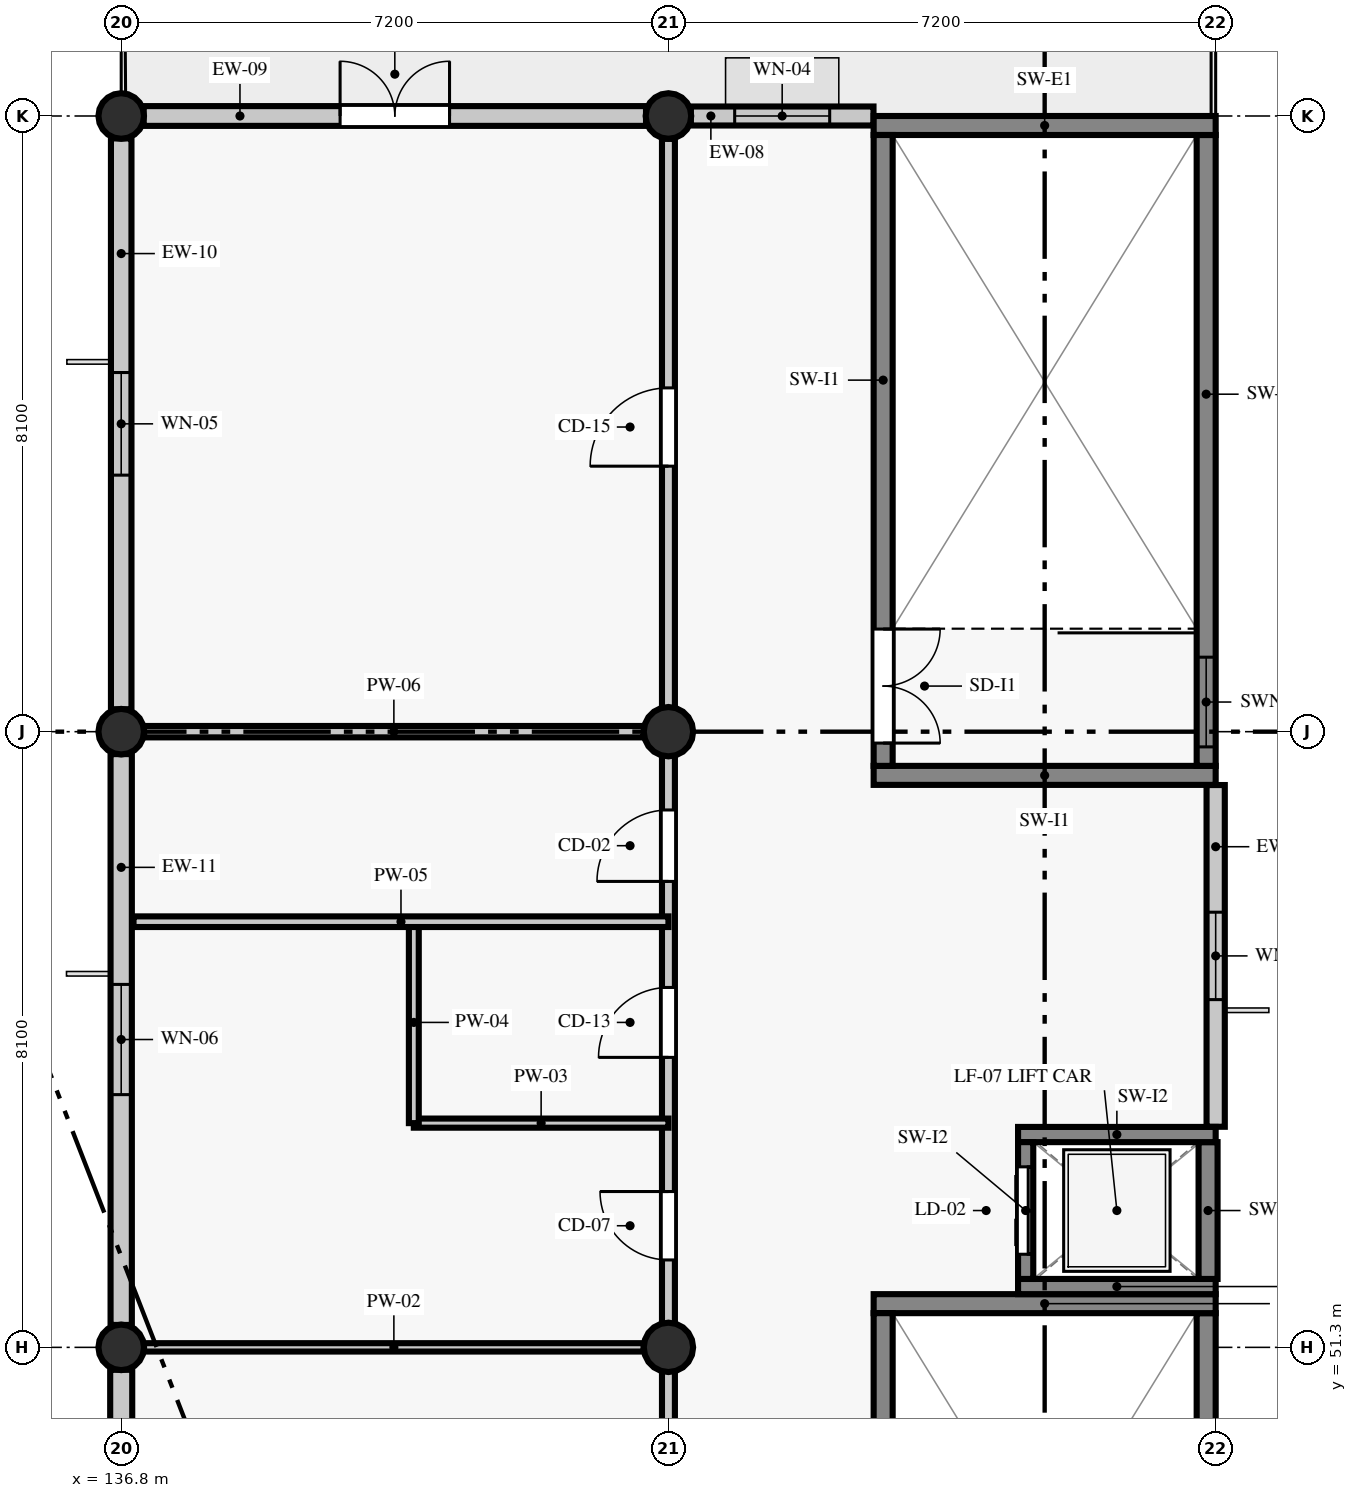
"""IFC4 building model, lengths in metres.
Left out: names, types, materials, properties, quantities, classifications, styles, units other than length and angle.
Written with IfcOpenShell. Run it as: python <this file> out.ifc"""

import sys

from ifc_helpers import new_model, si_unit, direction, frame, frame_2d, origin, origin_2d, place, context, subcontext, project, spatial, rectangle, circle, extrude, element, fill, save


model = new_model("IFC4")
c1 = context("Model", 3, precision=1e-05, world=origin(), true_north=direction((0.0, 1.0)))
c2 = subcontext(c1, "Body", "Model", "MODEL_VIEW")
j1 = project(units=[si_unit("LENGTHUNIT", "METRE"), si_unit("PLANEANGLEUNIT", "RADIAN")], contexts=[c1])
p1 = place(None, origin())
s1 = spatial("IfcSite", under=j1, at=p1, CompositionType="ELEMENT")
p2 = place(p1, origin())
s2 = spatial("IfcBuilding", under=s1, at=p2, CompositionType="ELEMENT")
p3 = place(p2, frame((0.0, 0.0, 9.6)))
s3 = spatial("IfcBuildingStorey", under=s2, at=p3, CompositionType="ELEMENT", Elevation=9.6)
for number, where, z_axis, x_axis in (
    (1, (136.8, 51.3, 0.0), (0.0, 0.0, 1.0), (1.0, 0.0, 0.0)),
    (2, (136.8, 59.4, 0.0), (0.0, 0.0, 1.0), (1.0, 0.0, 0.0)),
    (3, (136.8, 67.5, 0.0), (0.0, 0.0, 1.0), (1.0, 0.0, 0.0)),
):
    element("IfcColumn", number, at=place(p3, frame(where, z_axis=z_axis, x_axis=x_axis)), inside=s3, PredefinedType="COLUMN", context=c2, shape_type="SweptSolid", body=[
        extrude(circle(Radius=0.3, at=origin_2d()), origin(), (0.0, 0.0, 1.0), 4.2),
    ])
for number, where, z_axis, x_axis in (
    (4, (144.0, 51.3, 0.0), (0.0, 0.0, 1.0), (1.0, 0.0, 0.0)),
    (5, (144.0, 59.4, 0.0), (0.0, 0.0, 1.0), (1.0, 0.0, 0.0)),
):
    element("IfcColumn", number, at=place(p3, frame(where, z_axis=z_axis, x_axis=x_axis)), inside=s3, PredefinedType="COLUMN", context=c2, shape_type="SweptSolid", body=[
        extrude(circle(Radius=0.325, at=origin_2d()), origin(), (0.0, 0.0, 1.0), 4.2),
    ])
p4 = place(p3, frame((144.0, 67.5, 0.0), z_axis=(0.0, 0.0, 1.0), x_axis=(1.0, 0.0, 0.0)))
e6 = element("IfcColumn", 6, at=p4, inside=s3, PredefinedType="COLUMN", context=c2, shape_type="SweptSolid", body=[
    extrude(circle(Radius=0.3, at=origin_2d()), origin(), (0.0, 0.0, 1.0), 4.2),
])
p5 = place(p3, frame((151.2, 54.202, 0.0), z_axis=(0.0, 0.0, 1.0), x_axis=(0.0, 1.0, 0.0)))
e7 = element("IfcWall", 7, at=p5, inside=s3, PredefinedType="STANDARD", context=c2, shape_type="SweptSolid", body=[
    extrude(rectangle(XDim=4.496, YDim=0.24, at=frame_2d((2.248, 0.0))), origin(), (0.0, 0.0, 1.0), 4.2),
])
p6 = place(p5, frame((1.673, 0.0, 0.9)))
e8 = element("IfcOpeningElement", 8, at=p6, cuts=e7, PredefinedType="OPENING", context=c2, shape_type="SweptSolid", body=[
    extrude(rectangle(XDim=1.15, YDim=1.3, at=frame_2d((0.575, 0.65))), frame((0.0, 0.13, 0.0), z_axis=(0.0, -1.0, 0.0), x_axis=(1.0, 0.0, 0.0)), (0.0, 0.0, 1.0), 0.26),
])
p7 = place(p3, frame((146.698, 67.5, 0.0), z_axis=(0.0, 0.0, 1.0), x_axis=(-1.0, 0.0, 0.0)))
e9 = element("IfcWall", 9, at=p7, inside=s3, PredefinedType="STANDARD", context=c2, shape_type="SweptSolid", body=[
    extrude(rectangle(XDim=2.403, YDim=0.25, at=frame_2d((1.202, 0.0))), origin(), (0.0, 0.0, 1.0), 4.2),
])
p8 = place(p7, frame((0.576, 0.0, 0.9)))
e10 = element("IfcOpeningElement", 10, at=p8, cuts=e9, PredefinedType="OPENING", context=c2, shape_type="SweptSolid", body=[
    extrude(rectangle(XDim=1.25, YDim=1.3, at=frame_2d((0.625, 0.65))), frame((0.0, 0.135, 0.0), z_axis=(0.0, -1.0, 0.0), x_axis=(1.0, 0.0, 0.0)), (0.0, 0.0, 1.0), 0.27),
])
p9 = place(p3, frame((143.705, 67.5, 0.0), z_axis=(0.0, 0.0, 1.0), x_axis=(-1.0, 0.0, 0.0)))
e11 = element("IfcWall", 11, at=p9, inside=s3, PredefinedType="STANDARD", context=c2, shape_type="SweptSolid", body=[
    extrude(rectangle(XDim=6.61, YDim=0.26, at=frame_2d((3.305, 0.0))), origin(), (0.0, 0.0, 1.0), 3.55),
])
p10 = place(p9, frame((2.585, 0.0, 0.0)))
e12 = element("IfcOpeningElement", 12, at=p10, cuts=e11, PredefinedType="OPENING", context=c2, shape_type="SweptSolid", body=[
    extrude(rectangle(XDim=1.44, YDim=2.16, at=frame_2d((0.72, 1.08))), frame((0.0, 0.14, 0.0), z_axis=(0.0, -1.0, 0.0), x_axis=(1.0, 0.0, 0.0)), (0.0, 0.0, 1.0), 0.28),
])
p11 = place(p3, frame((136.8, 67.205, 0.0), z_axis=(0.0, 0.0, 1.0), x_axis=(0.0, -1.0, 0.0)))
e13 = element("IfcWall", 13, at=p11, inside=s3, PredefinedType="STANDARD", context=c2, shape_type="SweptSolid", body=[
    extrude(rectangle(XDim=7.51, YDim=0.27, at=frame_2d((3.755, 0.0))), origin(), (0.0, 0.0, 1.0), 3.55),
])
p12 = place(p11, frame((3.08, 0.0, 0.9)))
e14 = element("IfcOpeningElement", 14, at=p12, cuts=e13, PredefinedType="OPENING", context=c2, shape_type="SweptSolid", body=[
    extrude(rectangle(XDim=1.35, YDim=1.3, at=frame_2d((0.675, 0.65))), frame((0.0, 0.145, 0.0), z_axis=(0.0, -1.0, 0.0), x_axis=(1.0, 0.0, 0.0)), (0.0, 0.0, 1.0), 0.29),
])
p13 = place(p3, frame((136.8, 59.105, 0.0), z_axis=(0.0, 0.0, 1.0), x_axis=(0.0, -1.0, 0.0)))
e15 = element("IfcWall", 15, at=p13, inside=s3, PredefinedType="STANDARD", context=c2, shape_type="SweptSolid", body=[
    extrude(rectangle(XDim=7.51, YDim=0.28, at=frame_2d((3.755, 0.0))), origin(), (0.0, 0.0, 1.0), 3.55),
])
p14 = place(p13, frame((3.03, 0.0, 0.9)))
e16 = element("IfcOpeningElement", 16, at=p14, cuts=e15, PredefinedType="OPENING", context=c2, shape_type="SweptSolid", body=[
    extrude(rectangle(XDim=1.45, YDim=1.3, at=frame_2d((0.725, 0.65))), frame((0.0, 0.15, 0.0), z_axis=(0.0, -1.0, 0.0), x_axis=(1.0, 0.0, 0.0)), (0.0, 0.0, 1.0), 0.3),
])
p15 = place(p3, frame((136.8, 51.005, 0.0), z_axis=(0.0, 0.0, 1.0), x_axis=(0.0, -1.0, 0.0)))
e17 = element("IfcWall", 17, at=p15, inside=s3, PredefinedType="STANDARD", context=c2, shape_type="SweptSolid", body=[
    extrude(rectangle(XDim=7.51, YDim=0.29, at=frame_2d((3.755, 0.0))), origin(), (0.0, 0.0, 1.0), 3.55),
])
p16 = place(p15, frame((2.98, 0.0, 0.9)))
e18 = element("IfcOpeningElement", 18, at=p16, cuts=e17, PredefinedType="OPENING", context=c2, shape_type="SweptSolid", body=[
    extrude(rectangle(XDim=1.55, YDim=1.3, at=frame_2d((0.775, 0.65))), frame((0.0, 0.155, 0.0), z_axis=(0.0, -1.0, 0.0), x_axis=(1.0, 0.0, 0.0)), (0.0, 0.0, 1.0), 0.31),
])
p17 = place(p3, frame((151.075, 43.45, 0.0), z_axis=(0.0, 0.0, 1.0), x_axis=(0.0, 1.0, 0.0)))
e19 = element("IfcWall", 19, at=p17, inside=s3, PredefinedType="SHEAR", context=c2, shape_type="SweptSolid", body=[
    extrude(rectangle(XDim=8.3, YDim=0.25, at=frame_2d((4.15, 0.0))), origin(), (0.0, 0.0, 1.0), 4.2),
])
p18 = place(p17, frame((0.25, 0.0, 0.92)))
e20 = element("IfcOpeningElement", 20, at=p18, cuts=e19, PredefinedType="OPENING", context=c2, shape_type="SweptSolid", body=[
    extrude(rectangle(XDim=1.18, YDim=1.48, at=frame_2d((0.59, 0.74))), frame((0.0, 0.135, 0.0), z_axis=(0.0, -1.0, 0.0), x_axis=(1.0, 0.0, 0.0)), (0.0, 0.0, 1.0), 0.27),
])
p19 = place(p3, frame((151.2, 51.875, 0.0), z_axis=(0.0, 0.0, 1.0), x_axis=(-1.0, 0.0, 0.0)))
e21 = element("IfcWall", 21, at=p19, inside=s3, PredefinedType="SHEAR", context=c2, shape_type="SweptSolid", body=[
    extrude(rectangle(XDim=4.5, YDim=0.25, at=frame_2d((2.25, 0.0))), origin(), (0.0, 0.0, 1.0), 4.2),
])
p20 = place(p3, frame((146.825, 51.75, 0.0), z_axis=(0.0, 0.0, 1.0), x_axis=(0.0, -1.0, 0.0)))
e22 = element("IfcWall", 22, at=p20, inside=s3, PredefinedType="SHEAR", context=c2, shape_type="SweptSolid", body=[
    extrude(rectangle(XDim=8.3, YDim=0.25, at=frame_2d((4.15, 0.0))), origin(), (0.0, 0.0, 1.0), 4.2),
])
p21 = place(p20, frame((6.5, 0.0, 0.0)))
e23 = element("IfcOpeningElement", 23, at=p21, cuts=e22, PredefinedType="OPENING", context=c2, shape_type="SweptSolid", body=[
    extrude(rectangle(XDim=1.5, YDim=2.15, at=frame_2d((0.75, 1.075))), frame((0.0, 0.135, 0.0), z_axis=(0.0, -1.0, 0.0), x_axis=(1.0, 0.0, 0.0)), (0.0, 0.0, 1.0), 0.27),
])
p22 = place(p3, frame((146.7, 58.825, 0.0), z_axis=(0.0, 0.0, 1.0), x_axis=(1.0, 0.0, 0.0)))
e24 = element("IfcWall", 24, at=p22, inside=s3, PredefinedType="SHEAR", context=c2, shape_type="SweptSolid", body=[
    extrude(rectangle(XDim=4.5, YDim=0.25, at=frame_2d((2.25, 0.0))), origin(), (0.0, 0.0, 1.0), 4.2),
])
p23 = place(p3, frame((151.075, 58.95, 0.0), z_axis=(0.0, 0.0, 1.0), x_axis=(0.0, 1.0, 0.0)))
e25 = element("IfcWall", 25, at=p23, inside=s3, PredefinedType="SHEAR", context=c2, shape_type="SweptSolid", body=[
    extrude(rectangle(XDim=8.3, YDim=0.25, at=frame_2d((4.15, 0.0))), origin(), (0.0, 0.0, 1.0), 4.2),
])
p24 = place(p23, frame((0.25, 0.0, 0.92)))
e26 = element("IfcOpeningElement", 26, at=p24, cuts=e25, PredefinedType="OPENING", context=c2, shape_type="SweptSolid", body=[
    extrude(rectangle(XDim=1.18, YDim=1.48, at=frame_2d((0.59, 0.74))), frame((0.0, 0.135, 0.0), z_axis=(0.0, -1.0, 0.0), x_axis=(1.0, 0.0, 0.0)), (0.0, 0.0, 1.0), 0.27),
])
p25 = place(p3, frame((151.2, 67.375, 0.0), z_axis=(0.0, 0.0, 1.0), x_axis=(-1.0, 0.0, 0.0)))
e27 = element("IfcWall", 27, at=p25, inside=s3, PredefinedType="SHEAR", context=c2, shape_type="SweptSolid", body=[
    extrude(rectangle(XDim=4.5, YDim=0.25, at=frame_2d((2.25, 0.0))), origin(), (0.0, 0.0, 1.0), 4.2),
])
p26 = place(p3, frame((146.825, 67.25, 0.0), z_axis=(0.0, 0.0, 1.0), x_axis=(0.0, -1.0, 0.0)))
e28 = element("IfcWall", 28, at=p26, inside=s3, PredefinedType="SHEAR", context=c2, shape_type="SweptSolid", body=[
    extrude(rectangle(XDim=8.3, YDim=0.25, at=frame_2d((4.15, 0.0))), origin(), (0.0, 0.0, 1.0), 4.2),
])
p27 = place(p26, frame((6.5, 0.0, 0.0)))
e29 = element("IfcOpeningElement", 29, at=p27, cuts=e28, PredefinedType="OPENING", context=c2, shape_type="SweptSolid", body=[
    extrude(rectangle(XDim=1.5, YDim=2.15, at=frame_2d((0.75, 1.075))), frame((0.0, 0.135, 0.0), z_axis=(0.0, -1.0, 0.0), x_axis=(1.0, 0.0, 0.0)), (0.0, 0.0, 1.0), 0.27),
])
p28 = place(p3, frame((148.6, 52.1, 0.0), z_axis=(0.0, 0.0, 1.0), x_axis=(1.0, 0.0, 0.0)))
e30 = element("IfcWall", 30, at=p28, inside=s3, PredefinedType="SHEAR", context=c2, shape_type="SweptSolid", body=[
    extrude(rectangle(XDim=2.6, YDim=0.2, at=frame_2d((1.3, 0.0))), origin(), (0.0, 0.0, 1.0), 4.2),
])
p29 = place(p3, frame((151.1, 52.2, 0.0), z_axis=(0.0, 0.0, 1.0), x_axis=(0.0, 1.0, 0.0)))
e31 = element("IfcWall", 31, at=p29, inside=s3, PredefinedType="SHEAR", context=c2, shape_type="SweptSolid", body=[
    extrude(rectangle(XDim=1.8, YDim=0.25, at=frame_2d((0.9, 0.0))), origin(), (0.0, 0.0, 1.0), 4.2),
])
p30 = place(p3, frame((151.2, 54.1, 0.0), z_axis=(0.0, 0.0, 1.0), x_axis=(-1.0, 0.0, 0.0)))
e32 = element("IfcWall", 32, at=p30, inside=s3, PredefinedType="SHEAR", context=c2, shape_type="SweptSolid", body=[
    extrude(rectangle(XDim=2.6, YDim=0.2, at=frame_2d((1.3, 0.0))), origin(), (0.0, 0.0, 1.0), 4.2),
])
p31 = place(p3, frame((148.7, 54.0, 0.0), z_axis=(0.0, 0.0, 1.0), x_axis=(0.0, -1.0, 0.0)))
e33 = element("IfcWall", 33, at=p31, inside=s3, PredefinedType="SHEAR", context=c2, shape_type="SweptSolid", body=[
    extrude(rectangle(XDim=1.8, YDim=0.2, at=frame_2d((0.9, 0.0))), origin(), (0.0, 0.0, 1.0), 4.2),
])
p32 = place(p31, frame((0.325, 0.0, 0.0)))
e34 = element("IfcOpeningElement", 34, at=p32, cuts=e33, PredefinedType="OPENING", context=c2, shape_type="SweptSolid", body=[
    extrude(rectangle(XDim=1.15, YDim=2.15, at=frame_2d((0.575, 1.075))), frame((0.0, 0.11, 0.0), z_axis=(0.0, -1.0, 0.0), x_axis=(1.0, 0.0, 0.0)), (0.0, 0.0, 1.0), 0.22),
])
p33 = place(p3, frame((144.0, 43.5, 0.0), z_axis=(0.0, 0.0, 1.0), x_axis=(0.0, 1.0, 0.0)))
e35 = element("IfcWall", 35, at=p33, inside=s3, PredefinedType="PARTITIONING", context=c2, shape_type="SweptSolid", body=[
    extrude(rectangle(XDim=23.7, YDim=0.17, at=frame_2d((11.85, 0.0))), origin(), (0.0, 0.0, 1.0), 3.75),
])
p34 = place(p33, frame((3.243, 0.0, 0.0)))
e36 = element("IfcOpeningElement", 36, at=p34, cuts=e35, PredefinedType="OPENING", context=c2, shape_type="SweptSolid", body=[
    extrude(rectangle(XDim=1.1, YDim=2.13, at=frame_2d((0.55, 1.065))), frame((0.0, 0.095, 0.0), z_axis=(0.0, -1.0, 0.0), x_axis=(1.0, 0.0, 0.0)), (0.0, 0.0, 1.0), 0.19),
])
p35 = place(p33, frame((8.95, 0.0, 0.0)))
e37 = element("IfcOpeningElement", 37, at=p35, cuts=e35, PredefinedType="OPENING", context=c2, shape_type="SweptSolid", body=[
    extrude(rectangle(XDim=0.9, YDim=2.13, at=frame_2d((0.45, 1.065))), frame((0.0, 0.095, 0.0), z_axis=(0.0, -1.0, 0.0), x_axis=(1.0, 0.0, 0.0)), (0.0, 0.0, 1.0), 0.19),
])
p36 = place(p33, frame((11.615, 0.0, 0.0)))
e38 = element("IfcOpeningElement", 38, at=p36, cuts=e35, PredefinedType="OPENING", context=c2, shape_type="SweptSolid", body=[
    extrude(rectangle(XDim=0.92, YDim=2.18, at=frame_2d((0.46, 1.09))), frame((0.0, 0.095, 0.0), z_axis=(0.0, -1.0, 0.0), x_axis=(1.0, 0.0, 0.0)), (0.0, 0.0, 1.0), 0.19),
])
p37 = place(p33, frame((13.93, 0.0, 0.0)))
e39 = element("IfcOpeningElement", 39, at=p37, cuts=e35, PredefinedType="OPENING", context=c2, shape_type="SweptSolid", body=[
    extrude(rectangle(XDim=0.94, YDim=2.08, at=frame_2d((0.47, 1.04))), frame((0.0, 0.095, 0.0), z_axis=(0.0, -1.0, 0.0), x_axis=(1.0, 0.0, 0.0)), (0.0, 0.0, 1.0), 0.19),
])
p38 = place(p33, frame((19.393, 0.0, 0.0)))
e40 = element("IfcOpeningElement", 40, at=p38, cuts=e35, PredefinedType="OPENING", context=c2, shape_type="SweptSolid", body=[
    extrude(rectangle(XDim=1.03, YDim=2.18, at=frame_2d((0.515, 1.09))), frame((0.0, 0.095, 0.0), z_axis=(0.0, -1.0, 0.0), x_axis=(1.0, 0.0, 0.0)), (0.0, 0.0, 1.0), 0.19),
])
p39 = place(p3, frame((137.1, 51.3, 0.0), z_axis=(0.0, 0.0, 1.0), x_axis=(1.0, 0.0, 0.0)))
e41 = element("IfcWall", 41, at=p39, inside=s3, PredefinedType="PARTITIONING", context=c2, shape_type="SweptSolid", body=[
    extrude(rectangle(XDim=6.575, YDim=0.11, at=frame_2d((3.288, 0.0))), origin(), (0.0, 0.0, 1.0), 3.5),
])
p40 = place(p3, frame((140.65, 54.25, 0.0), z_axis=(0.0, 0.0, 1.0), x_axis=(1.0, 0.0, 0.0)))
e42 = element("IfcWall", 42, at=p40, inside=s3, PredefinedType="PARTITIONING", context=c2, shape_type="SweptSolid", body=[
    extrude(rectangle(XDim=3.35, YDim=0.12, at=frame_2d((1.675, 0.0))), origin(), (0.0, 0.0, 1.0), 4.2),
])
p41 = place(p3, frame((140.65, 54.25, 0.0), z_axis=(0.0, 0.0, 1.0), x_axis=(0.0, 1.0, 0.0)))
e43 = element("IfcWall", 43, at=p41, inside=s3, PredefinedType="PARTITIONING", context=c2, shape_type="SweptSolid", body=[
    extrude(rectangle(XDim=2.65, YDim=0.13, at=frame_2d((1.325, 0.0))), origin(), (0.0, 0.0, 1.0), 3.84),
])
p42 = place(p3, frame((136.962, 56.9, 0.0), z_axis=(0.0, 0.0, 1.0), x_axis=(1.0, 0.0, 0.0)))
e44 = element("IfcWall", 44, at=p42, inside=s3, PredefinedType="PARTITIONING", context=c2, shape_type="SweptSolid", body=[
    extrude(rectangle(XDim=7.038, YDim=0.14, at=frame_2d((3.519, 0.0))), origin(), (0.0, 0.0, 1.0), 4.2),
])
p43 = place(p3, frame((137.1, 59.4, 0.0), z_axis=(0.0, 0.0, 1.0), x_axis=(1.0, 0.0, 0.0)))
e45 = element("IfcWall", 45, at=p43, inside=s3, PredefinedType="PARTITIONING", context=c2, shape_type="SweptSolid", body=[
    extrude(rectangle(XDim=6.575, YDim=0.15, at=frame_2d((3.288, 0.0))), origin(), (0.0, 0.0, 1.0), 3.5),
])
p44 = place(p6, origin())
e46 = element("IfcWindow", 46, at=p44, inside=s3, PartitioningType="SINGLE_PANEL", PredefinedType="WINDOW", context=c2, shape_type="SweptSolid", body=[
    extrude(rectangle(XDim=1.15, YDim=1.3, at=frame_2d((0.575, 0.65))), frame((0.0, 0.03, 0.0), z_axis=(0.0, -1.0, 0.0), x_axis=(1.0, 0.0, 0.0)), (0.0, 0.0, 1.0), 0.06),
])
fill(e8, e46)
p45 = place(p8, origin())
e47 = element("IfcWindow", 47, at=p45, inside=s3, PartitioningType="SINGLE_PANEL", PredefinedType="WINDOW", context=c2, shape_type="SweptSolid", body=[
    extrude(rectangle(XDim=1.25, YDim=1.3, at=frame_2d((0.625, 0.65))), frame((0.0, 0.03, 0.0), z_axis=(0.0, -1.0, 0.0), x_axis=(1.0, 0.0, 0.0)), (0.0, 0.0, 1.0), 0.06),
])
fill(e10, e47)
p46 = place(p10, frame((1.44, 0.0, 0.0), z_axis=(0.0, 0.0, 1.0), x_axis=(-1.0, 0.0, 0.0)))
e48 = element("IfcDoor", 48, at=p46, inside=s3, OperationType="DOUBLE_DOOR_SINGLE_SWING", PredefinedType="DOOR", context=c2, shape_type="SweptSolid", body=[
    extrude(rectangle(XDim=1.44, YDim=2.16, at=frame_2d((0.72, 1.08))), frame((0.0, 0.025, 0.0), z_axis=(0.0, -1.0, 0.0), x_axis=(1.0, 0.0, 0.0)), (0.0, 0.0, 1.0), 0.05),
])
fill(e12, e48)
p47 = place(p12, origin())
e49 = element("IfcWindow", 49, at=p47, inside=s3, PartitioningType="SINGLE_PANEL", PredefinedType="WINDOW", context=c2, shape_type="SweptSolid", body=[
    extrude(rectangle(XDim=1.35, YDim=1.3, at=frame_2d((0.675, 0.65))), frame((0.0, 0.03, 0.0), z_axis=(0.0, -1.0, 0.0), x_axis=(1.0, 0.0, 0.0)), (0.0, 0.0, 1.0), 0.06),
])
fill(e14, e49)
p48 = place(p14, origin())
e50 = element("IfcWindow", 50, at=p48, inside=s3, PartitioningType="SINGLE_PANEL", PredefinedType="WINDOW", context=c2, shape_type="SweptSolid", body=[
    extrude(rectangle(XDim=1.45, YDim=1.3, at=frame_2d((0.725, 0.65))), frame((0.0, 0.03, 0.0), z_axis=(0.0, -1.0, 0.0), x_axis=(1.0, 0.0, 0.0)), (0.0, 0.0, 1.0), 0.06),
])
fill(e16, e50)
p49 = place(p24, origin())
e51 = element("IfcWindow", 51, at=p49, inside=s3, PartitioningType="SINGLE_PANEL", PredefinedType="WINDOW", context=c2, shape_type="SweptSolid", body=[
    extrude(rectangle(XDim=1.18, YDim=1.48, at=frame_2d((0.59, 0.74))), frame((0.0, 0.03, 0.0), z_axis=(0.0, -1.0, 0.0), x_axis=(1.0, 0.0, 0.0)), (0.0, 0.0, 1.0), 0.06),
])
fill(e26, e51)
p50 = place(p27, origin())
e52 = element("IfcDoor", 52, at=p50, inside=s3, OperationType="DOUBLE_DOOR_SINGLE_SWING", PredefinedType="DOOR", context=c2, shape_type="SweptSolid", body=[
    extrude(rectangle(XDim=1.5, YDim=2.15, at=frame_2d((0.75, 1.075))), frame((0.0, 0.025, 0.0), z_axis=(0.0, -1.0, 0.0), x_axis=(1.0, 0.0, 0.0)), (0.0, 0.0, 1.0), 0.05),
])
fill(e29, e52)
p51 = place(p32, frame((1.15, 0.0, 0.0), z_axis=(0.0, 0.0, 1.0), x_axis=(-1.0, 0.0, 0.0)))
e53 = element("IfcDoor", 53, at=p51, inside=s3, OperationType="DOUBLE_DOOR_SLIDING", PredefinedType="DOOR", context=c2, shape_type="SweptSolid", body=[
    extrude(rectangle(XDim=1.15, YDim=2.15, at=frame_2d((0.575, 1.075))), frame((0.0, 0.025, 0.0), z_axis=(0.0, -1.0, 0.0), x_axis=(1.0, 0.0, 0.0)), (0.0, 0.0, 1.0), 0.05),
])
fill(e34, e53)
p52 = place(p35, origin())
e54 = element("IfcDoor", 54, at=p52, inside=s3, OperationType="SINGLE_SWING_RIGHT", PredefinedType="DOOR", context=c2, shape_type="SweptSolid", body=[
    extrude(rectangle(XDim=0.9, YDim=2.13, at=frame_2d((0.45, 1.065))), frame((0.0, 0.025, 0.0), z_axis=(0.0, -1.0, 0.0), x_axis=(1.0, 0.0, 0.0)), (0.0, 0.0, 1.0), 0.05),
])
fill(e37, e54)
p53 = place(p36, origin())
e55 = element("IfcDoor", 55, at=p53, inside=s3, OperationType="SINGLE_SWING_LEFT", PredefinedType="DOOR", context=c2, shape_type="SweptSolid", body=[
    extrude(rectangle(XDim=0.92, YDim=2.18, at=frame_2d((0.46, 1.09))), frame((0.0, 0.025, 0.0), z_axis=(0.0, -1.0, 0.0), x_axis=(1.0, 0.0, 0.0)), (0.0, 0.0, 1.0), 0.05),
])
fill(e38, e55)
p54 = place(p37, origin())
e56 = element("IfcDoor", 56, at=p54, inside=s3, OperationType="SINGLE_SWING_LEFT", PredefinedType="DOOR", context=c2, shape_type="SweptSolid", body=[
    extrude(rectangle(XDim=0.94, YDim=2.08, at=frame_2d((0.47, 1.04))), frame((0.0, 0.025, 0.0), z_axis=(0.0, -1.0, 0.0), x_axis=(1.0, 0.0, 0.0)), (0.0, 0.0, 1.0), 0.05),
])
fill(e39, e56)
p55 = place(p38, origin())
e57 = element("IfcDoor", 57, at=p55, inside=s3, OperationType="SINGLE_SWING_LEFT", PredefinedType="DOOR", context=c2, shape_type="SweptSolid", body=[
    extrude(rectangle(XDim=1.03, YDim=2.18, at=frame_2d((0.515, 1.09))), frame((0.0, 0.025, 0.0), z_axis=(0.0, -1.0, 0.0), x_axis=(1.0, 0.0, 0.0)), (0.0, 0.0, 1.0), 0.05),
])
fill(e40, e57)
save(model, sys.argv[1])
